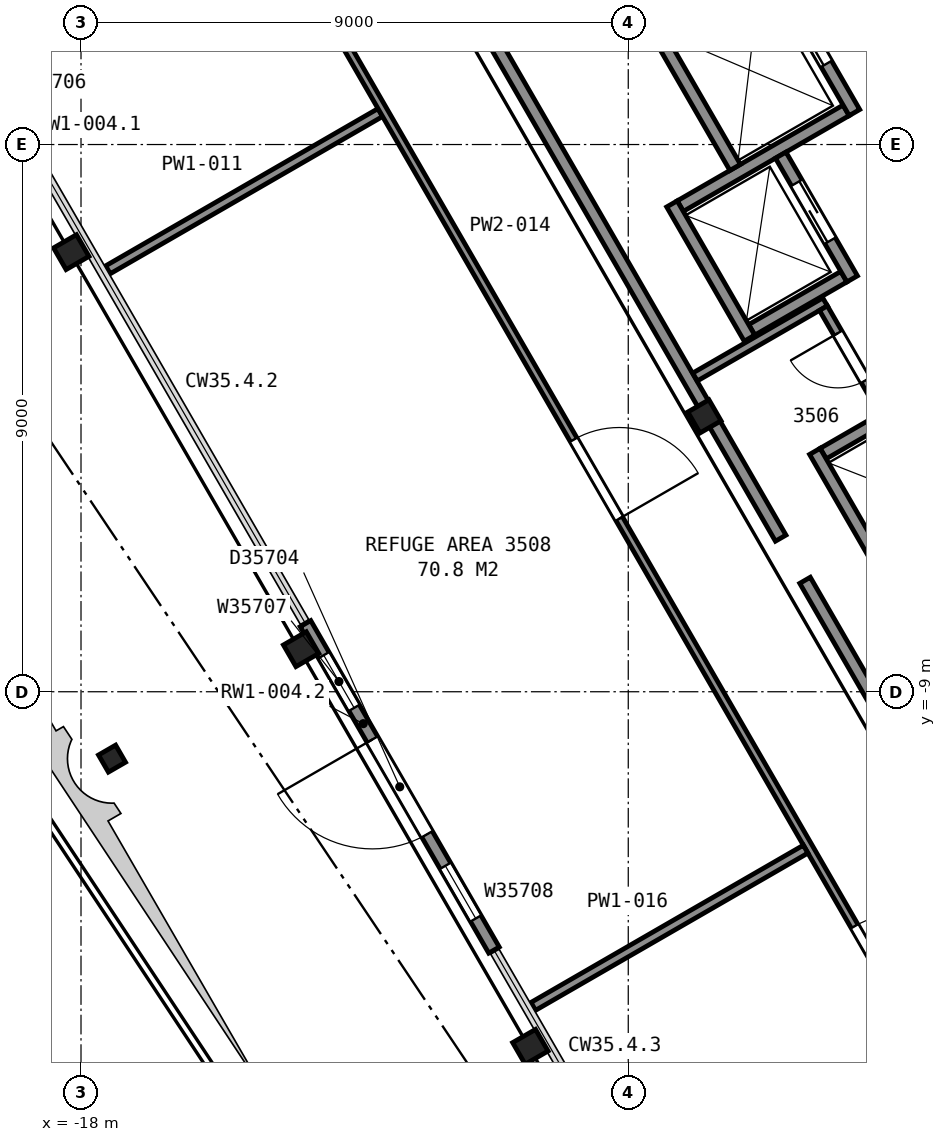
"""IFC4 building model, lengths in metres.
Left out: names, types, materials, properties, quantities, classifications, styles, units other than length and angle.
Written with IfcOpenShell. Run it as: python <this file> out.ifc"""

import sys

from ifc_helpers import new_model, si_unit, direction, frame, frame_2d, origin, origin_2d, place, context, subcontext, project, spatial, rectangle, hollow_circle, i_section, extrude, element, fill, save


model = new_model("IFC4")
c1 = context("Model", 3, precision=1e-05, world=origin(), true_north=direction((0.0, 1.0)))
c2 = subcontext(c1, "Body", "Model", "MODEL_VIEW")
j1 = project(units=[si_unit("LENGTHUNIT", "METRE"), si_unit("PLANEANGLEUNIT", "RADIAN")], contexts=[c1])
p1 = place(None, origin())
s1 = spatial("IfcSite", under=j1, at=p1, CompositionType="ELEMENT")
p2 = place(p1, origin())
s2 = spatial("IfcBuilding", under=s1, at=p2, CompositionType="ELEMENT")
p3 = place(p2, frame((0.0, 0.0, 143.2)))
s3 = spatial("IfcBuildingStorey", under=s2, at=p3, CompositionType="ELEMENT", Elevation=143.2)
for number, where, z_axis, x_axis in (
    (1, (-18.16, -1.77, -0.16), (0.0, 0.0, 1.0), (-0.5, 0.866, 0.0)),
    (2, (-14.38, -8.3, -0.16), (0.0, 0.0, 1.0), (-0.5, 0.866, 0.0)),
    (3, (-10.61, -14.84, -0.16), (0.0, 0.0, 1.0), (-0.5, 0.866, 0.0)),
):
    element("IfcColumn", number, at=place(p3, frame(where, z_axis=z_axis, x_axis=x_axis)), inside=s3, PredefinedType="COLUMN", context=c2, shape_type="SweptSolid", body=[
        extrude(i_section(OverallWidth=0.411, OverallDepth=0.434, WebThickness=0.036, FlangeThickness=0.057, FilletRadius=0.015, at=origin_2d()), origin(), (0.0, 0.0, 1.0), 5.76),
    ])
p4 = place(p3, frame((-7.963, -4.596, 0.04), z_axis=(0.18158785929, 0.104740603763, 0.97778078079), x_axis=(0.983190410974, -8.7292444e-05, -0.182583154064)))
e4 = element("IfcColumn", 4, at=p4, inside=s3, PredefinedType="COLUMN", context=c2, shape_type="SweptSolid", body=[
    extrude(i_section(OverallWidth=0.401, OverallDepth=0.399, WebThickness=0.025, FlangeThickness=0.04, FilletRadius=0.015, at=origin_2d()), origin(), (0.0, 0.0, 1.0), 5.646),
])
p5 = place(p3, frame((-17.49, -10.1, -0.73), z_axis=(0.0, 0.0, 1.0), x_axis=(-0.5, 0.866025403784, 0.0)))
e5 = element("IfcColumn", 5, at=p5, inside=s3, PredefinedType="COLUMN", context=c2, shape_type="SweptSolid", body=[
    extrude(hollow_circle(Radius=0.163, WallThickness=0.013, at=origin_2d()), origin(), (0.0, 0.0, 1.0), 5.17),
])
p6 = place(p3, frame((-14.308, -7.879, 0.0), z_axis=(0.0, 0.0, 1.0), x_axis=(0.49998037582, -0.866036733513, 0.0)))
e6 = element("IfcWall", 6, at=p6, inside=s3, PredefinedType="SOLIDWALL", context=c2, shape_type="SweptSolid", body=[
    extrude(rectangle(XDim=6.2, YDim=0.2, at=frame_2d((3.1, 0.0))), origin(), (0.0, 0.0, 1.0), 4.323),
])
p7 = place(p6, frame((0.6, 0.0, 0.9)))
e7 = element("IfcOpeningElement", 7, at=p7, cuts=e6, PredefinedType="OPENING", context=c2, shape_type="SweptSolid", body=[
    extrude(rectangle(XDim=1.0, YDim=1.5, at=frame_2d((0.5, 0.75))), frame((0.0, 0.11, 0.0), z_axis=(0.0, -1.0, 0.0), x_axis=(1.0, 0.0, 0.0)), (0.0, 0.0, 1.0), 0.22),
])
p8 = place(p6, frame((2.2, 0.0, 0.0)))
e8 = element("IfcOpeningElement", 8, at=p8, cuts=e6, PredefinedType="OPENING", context=c2, shape_type="SweptSolid", body=[
    extrude(rectangle(XDim=1.8, YDim=2.4, at=frame_2d((0.9, 1.2))), frame((0.0, 0.11, 0.0), z_axis=(0.0, -1.0, 0.0), x_axis=(1.0, 0.0, 0.0)), (0.0, 0.0, 1.0), 0.22),
])
p9 = place(p6, frame((4.6, 0.0, 0.9)))
e9 = element("IfcOpeningElement", 9, at=p9, cuts=e6, PredefinedType="OPENING", context=c2, shape_type="SweptSolid", body=[
    extrude(rectangle(XDim=1.0, YDim=1.5, at=frame_2d((0.5, 0.75))), frame((0.0, 0.11, 0.0), z_axis=(0.0, -1.0, 0.0), x_axis=(1.0, 0.0, 0.0)), (0.0, 0.0, 1.0), 0.22),
])
for number, where, z_axis, x_axis in (
    (10, (-5.795, -5.083, 0.0), (0.0, 0.0, 1.0), (0.866, 0.5, 0.0)),
    (11, (-6.97, -3.048, 0.0), (0.0, 0.0, 1.0), (0.866, 0.5, 0.0)),
):
    element("IfcWall", number, at=place(p3, frame(where, z_axis=z_axis, x_axis=x_axis)), inside=s3, PredefinedType="PARTITIONING", context=c2, shape_type="SweptSolid", body=[
        extrude(rectangle(XDim=1.75, YDim=0.2, at=frame_2d((0.875, 0.0))), origin(), (0.0, 0.0, 1.0), 5.6),
    ])
p10 = place(p3, frame((-8.145, -1.013, 0.0), z_axis=(0.0, 0.0, 1.0), x_axis=(0.866016494683, 0.500015430699, 0.0)))
e12 = element("IfcWall", 12, at=p10, inside=s3, PredefinedType="PARTITIONING", context=c2, shape_type="SweptSolid", body=[
    extrude(rectangle(XDim=3.15, YDim=0.2, at=frame_2d((1.575, 0.0))), origin(), (0.0, 0.0, 1.0), 5.6),
])
p11 = place(p3, frame((-5.28, 0.525, 0.0), z_axis=(0.0, 0.0, 1.0), x_axis=(-0.500037662692, 0.866003658127, 0.0)))
e13 = element("IfcWall", 13, at=p11, inside=s3, PredefinedType="PARTITIONING", context=c2, shape_type="SweptSolid", body=[
    extrude(rectangle(XDim=2.95, YDim=0.2, at=frame_2d((1.475, 0.0))), origin(), (0.0, 0.0, 1.0), 5.6),
])
p12 = place(p11, frame((0.925, 0.0, 0.0)))
e14 = element("IfcOpeningElement", 14, at=p12, cuts=e13, PredefinedType="OPENING", context=c2, shape_type="SweptSolid", body=[
    extrude(rectangle(XDim=1.1, YDim=2.1, at=frame_2d((0.55, 1.05))), frame((0.0, 0.11, 0.0), z_axis=(0.0, -1.0, 0.0), x_axis=(1.0, 0.0, 0.0)), (0.0, 0.0, 1.0), 0.22),
])
p13 = place(p3, frame((-5.318, -2.21, 0.0), z_axis=(0.0, 0.0, 1.0), x_axis=(-0.499938297808, 0.866061024631, 0.0)))
e15 = element("IfcWall", 15, at=p13, inside=s3, PredefinedType="PARTITIONING", context=c2, shape_type="SweptSolid", body=[
    extrude(rectangle(XDim=2.35, YDim=0.2, at=frame_2d((1.175, 0.0))), origin(), (0.0, 0.0, 1.0), 5.6),
])
p14 = place(p13, frame((0.725, 0.0, 0.0)))
e16 = element("IfcOpeningElement", 16, at=p14, cuts=e15, PredefinedType="OPENING", context=c2, shape_type="SweptSolid", body=[
    extrude(rectangle(XDim=1.1, YDim=2.1, at=frame_2d((0.55, 1.05))), frame((0.0, 0.11, 0.0), z_axis=(0.0, -1.0, 0.0), x_axis=(1.0, 0.0, 0.0)), (0.0, 0.0, 1.0), 0.22),
])
p15 = place(p3, frame((-7.242, -0.376, 0.0), z_axis=(0.0, 0.0, 1.0), x_axis=(-0.499996545922, 0.866027397988, 0.0)))
e17 = element("IfcWall", 17, at=p15, inside=s3, PredefinedType="PARTITIONING", context=c2, shape_type="SweptSolid", body=[
    extrude(rectangle(XDim=2.75, YDim=0.2, at=frame_2d((1.375, 0.0))), origin(), (0.0, 0.0, 1.0), 5.6),
])
for number, where, z_axis, x_axis in (
    (18, (-4.656, -7.255, 0.0), (0.0, 0.0, 1.0), (-0.5, 0.866, 0.0)),
    (19, (-7.006, -3.185, 0.0), (0.0, 0.0, 1.0), (-0.5, 0.866, 0.0)),
):
    element("IfcWall", number, at=place(p3, frame(where, z_axis=z_axis, x_axis=x_axis)), inside=s3, PredefinedType="PARTITIONING", context=c2, shape_type="SweptSolid", body=[
        extrude(rectangle(XDim=2.55, YDim=0.2, at=frame_2d((1.275, 0.0))), origin(), (0.0, 0.0, 1.0), 5.6),
    ])
p16 = place(p3, frame((-13.666, 5.95, 0.0), z_axis=(0.0, 0.0, 1.0), x_axis=(0.499988097782, -0.866032275424, 0.0)))
e20 = element("IfcWall", 20, at=p16, inside=s3, PredefinedType="PARTITIONING", context=c2, shape_type="SweptSolid", body=[
    extrude(rectangle(XDim=14.346, YDim=0.2, at=frame_2d((7.173, 0.0))), origin(), (0.0, 0.0, 1.0), 4.697),
])
p17 = place(p3, frame((-7.902, -3.823, 0.0), z_axis=(0.0, 0.0, 1.0), x_axis=(0.866014407023, 0.500019046465, 0.0)))
e21 = element("IfcWall", 21, at=p17, inside=s3, PredefinedType="PARTITIONING", context=c2, shape_type="SweptSolid", body=[
    extrude(rectangle(XDim=2.47, YDim=0.15, at=frame_2d((1.235, 0.0))), origin(), (0.0, 0.0, 1.0), 4.733),
])
p18 = place(p3, frame((-6.093, -7.167, 0.0), z_axis=(0.0, 0.0, 1.0), x_axis=(0.500010425738, -0.866019384398, 0.0)))
e22 = element("IfcWall", 22, at=p18, inside=s3, PredefinedType="PARTITIONING", context=c2, shape_type="SweptSolid", body=[
    extrude(rectangle(XDim=8.831, YDim=0.2, at=frame_2d((4.416, 0.0))), origin(), (0.0, 0.0, 1.0), 4.697),
])
p19 = place(p3, frame((-4.806, -4.395, 0.0), z_axis=(0.0, 0.0, 1.0), x_axis=(-0.500287931394, 0.865859102685, 0.0)))
e23 = element("IfcWall", 23, at=p19, inside=s3, PredefinedType="PARTITIONING", context=c2, shape_type="SweptSolid", body=[
    extrude(rectangle(XDim=1.968, YDim=0.15, at=frame_2d((0.984, 0.0))), origin(), (0.0, 0.0, 1.0), 5.35),
])
p20 = place(p19, frame((0.593, 0.0, 0.0)))
e24 = element("IfcOpeningElement", 24, at=p20, cuts=e23, PredefinedType="OPENING", context=c2, shape_type="SweptSolid", body=[
    extrude(rectangle(XDim=0.9, YDim=2.1, at=frame_2d((0.45, 1.05))), frame((0.0, 0.085, 0.0), z_axis=(0.0, -1.0, 0.0), x_axis=(1.0, 0.0, 0.0)), (0.0, 0.0, 1.0), 0.17),
])
p21 = place(p3, frame((-17.557, -2.06, 0.0), z_axis=(0.0, 0.0, 1.0), x_axis=(0.866047234669, 0.499962185892, 0.0)))
e25 = element("IfcWall", 25, at=p21, inside=s3, PredefinedType="PARTITIONING", context=c2, shape_type="SweptSolid", body=[
    extrude(rectangle(XDim=5.172, YDim=0.15, at=frame_2d((2.586, 0.0))), origin(), (0.0, 0.0, 1.0), 4.262),
])
p22 = place(p3, frame((-3.756, -15.494, 0.0), z_axis=(0.0, 0.0, 1.0), x_axis=(-0.500027787016, 0.866009360349, 0.0)))
e26 = element("IfcWall", 26, at=p22, inside=s3, PredefinedType="PARTITIONING", context=c2, shape_type="SweptSolid", body=[
    extrude(rectangle(XDim=23.856, YDim=0.125, at=frame_2d((11.928, 0.0))), origin(), (0.0, 0.0, 1.0), 4.262),
])
p23 = place(p22, frame((20.393, 0.0, 0.0)))
e27 = element("IfcOpeningElement", 27, at=p23, cuts=e26, PredefinedType="OPENING", context=c2, shape_type="SweptSolid", body=[
    extrude(rectangle(XDim=1.5, YDim=2.1, at=frame_2d((0.75, 1.05))), frame((0.0, 0.073, 0.0), z_axis=(0.0, -1.0, 0.0), x_axis=(1.0, 0.0, 0.0)), (0.0, 0.0, 1.0), 0.145),
])
p24 = place(p22, frame((10.785, 0.0, 0.0)))
e28 = element("IfcOpeningElement", 28, at=p24, cuts=e26, PredefinedType="OPENING", context=c2, shape_type="SweptSolid", body=[
    extrude(rectangle(XDim=1.5, YDim=2.1, at=frame_2d((0.75, 1.05))), frame((0.0, 0.073, 0.0), z_axis=(0.0, -1.0, 0.0), x_axis=(1.0, 0.0, 0.0)), (0.0, 0.0, 1.0), 0.145),
])
p25 = place(p22, frame((1.545, 0.0, 0.0)))
e29 = element("IfcOpeningElement", 29, at=p25, cuts=e26, PredefinedType="OPENING", context=c2, shape_type="SweptSolid", body=[
    extrude(rectangle(XDim=1.5, YDim=2.1, at=frame_2d((0.75, 1.05))), frame((0.0, 0.073, 0.0), z_axis=(0.0, -1.0, 0.0), x_axis=(1.0, 0.0, 0.0)), (0.0, 0.0, 1.0), 0.145),
])
p26 = place(p3, frame((-10.562, -14.175, 0.0), z_axis=(0.0, 0.0, 1.0), x_axis=(0.866079472015, 0.499906339382, 0.0)))
e30 = element("IfcWall", 30, at=p26, inside=s3, PredefinedType="PARTITIONING", context=c2, shape_type="SweptSolid", body=[
    extrude(rectangle(XDim=5.172, YDim=0.15, at=frame_2d((2.586, 0.0))), origin(), (0.0, 0.0, 1.0), 4.262),
])
p27 = place(p7, origin())
e31 = element("IfcWindow", 31, at=p27, inside=s3, PartitioningType="SINGLE_PANEL", PredefinedType="WINDOW", context=c2, shape_type="SweptSolid", body=[
    extrude(rectangle(XDim=1.0, YDim=1.5, at=frame_2d((0.5, 0.75))), frame((0.0, 0.03, 0.0), z_axis=(0.0, -1.0, 0.0), x_axis=(1.0, 0.0, 0.0)), (0.0, 0.0, 1.0), 0.06),
])
fill(e7, e31)
p28 = place(p8, frame((1.8, 0.0, 0.0), z_axis=(0.0, 0.0, 1.0), x_axis=(-1.0, 0.0, 0.0)))
e32 = element("IfcDoor", 32, at=p28, inside=s3, OperationType="DOUBLE_DOOR_SINGLE_SWING", PredefinedType="DOOR", context=c2, shape_type="SweptSolid", body=[
    extrude(rectangle(XDim=1.8, YDim=2.4, at=frame_2d((0.9, 1.2))), frame((0.0, 0.025, 0.0), z_axis=(0.0, -1.0, 0.0), x_axis=(1.0, 0.0, 0.0)), (0.0, 0.0, 1.0), 0.05),
])
fill(e8, e32)
p29 = place(p9, origin())
e33 = element("IfcWindow", 33, at=p29, inside=s3, PartitioningType="SINGLE_PANEL", PredefinedType="WINDOW", context=c2, shape_type="SweptSolid", body=[
    extrude(rectangle(XDim=1.0, YDim=1.5, at=frame_2d((0.5, 0.75))), frame((0.0, 0.03, 0.0), z_axis=(0.0, -1.0, 0.0), x_axis=(1.0, 0.0, 0.0)), (0.0, 0.0, 1.0), 0.06),
])
fill(e9, e33)
p30 = place(p14, origin())
e34 = element("IfcDoor", 34, at=p30, inside=s3, OperationType="SLIDING_TO_RIGHT", PredefinedType="DOOR", context=c2, shape_type="SweptSolid", body=[
    extrude(rectangle(XDim=1.1, YDim=2.1, at=frame_2d((0.55, 1.05))), frame((0.0, 0.025, 0.0), z_axis=(0.0, -1.0, 0.0), x_axis=(1.0, 0.0, 0.0)), (0.0, 0.0, 1.0), 0.05),
])
fill(e16, e34)
p31 = place(p12, origin())
e35 = element("IfcDoor", 35, at=p31, inside=s3, OperationType="SLIDING_TO_LEFT", PredefinedType="DOOR", context=c2, shape_type="SweptSolid", body=[
    extrude(rectangle(XDim=1.1, YDim=2.1, at=frame_2d((0.55, 1.05))), frame((0.0, 0.025, 0.0), z_axis=(0.0, -1.0, 0.0), x_axis=(1.0, 0.0, 0.0)), (0.0, 0.0, 1.0), 0.05),
])
fill(e14, e35)
p32 = place(p20, origin())
e36 = element("IfcDoor", 36, at=p32, inside=s3, OperationType="SINGLE_SWING_RIGHT", PredefinedType="DOOR", context=c2, shape_type="SweptSolid", body=[
    extrude(rectangle(XDim=0.9, YDim=2.1, at=frame_2d((0.45, 1.05))), frame((0.0, 0.025, 0.0), z_axis=(0.0, -1.0, 0.0), x_axis=(1.0, 0.0, 0.0)), (0.0, 0.0, 1.0), 0.05),
])
fill(e24, e36)
p33 = place(p24, origin())
e37 = element("IfcDoor", 37, at=p33, inside=s3, OperationType="DOUBLE_DOOR_SINGLE_SWING", PredefinedType="DOOR", context=c2, shape_type="SweptSolid", body=[
    extrude(rectangle(XDim=1.5, YDim=2.1, at=frame_2d((0.75, 1.05))), frame((0.0, 0.025, 0.0), z_axis=(0.0, -1.0, 0.0), x_axis=(1.0, 0.0, 0.0)), (0.0, 0.0, 1.0), 0.05),
])
fill(e28, e37)
p34 = place(p25, origin())
e38 = element("IfcDoor", 38, at=p34, inside=s3, OperationType="DOUBLE_DOOR_SINGLE_SWING", PredefinedType="DOOR", context=c2, shape_type="SweptSolid", body=[
    extrude(rectangle(XDim=1.5, YDim=2.1, at=frame_2d((0.75, 1.05))), frame((0.0, 0.025, 0.0), z_axis=(0.0, -1.0, 0.0), x_axis=(1.0, 0.0, 0.0)), (0.0, 0.0, 1.0), 0.05),
])
fill(e29, e38)
save(model, sys.argv[1])
